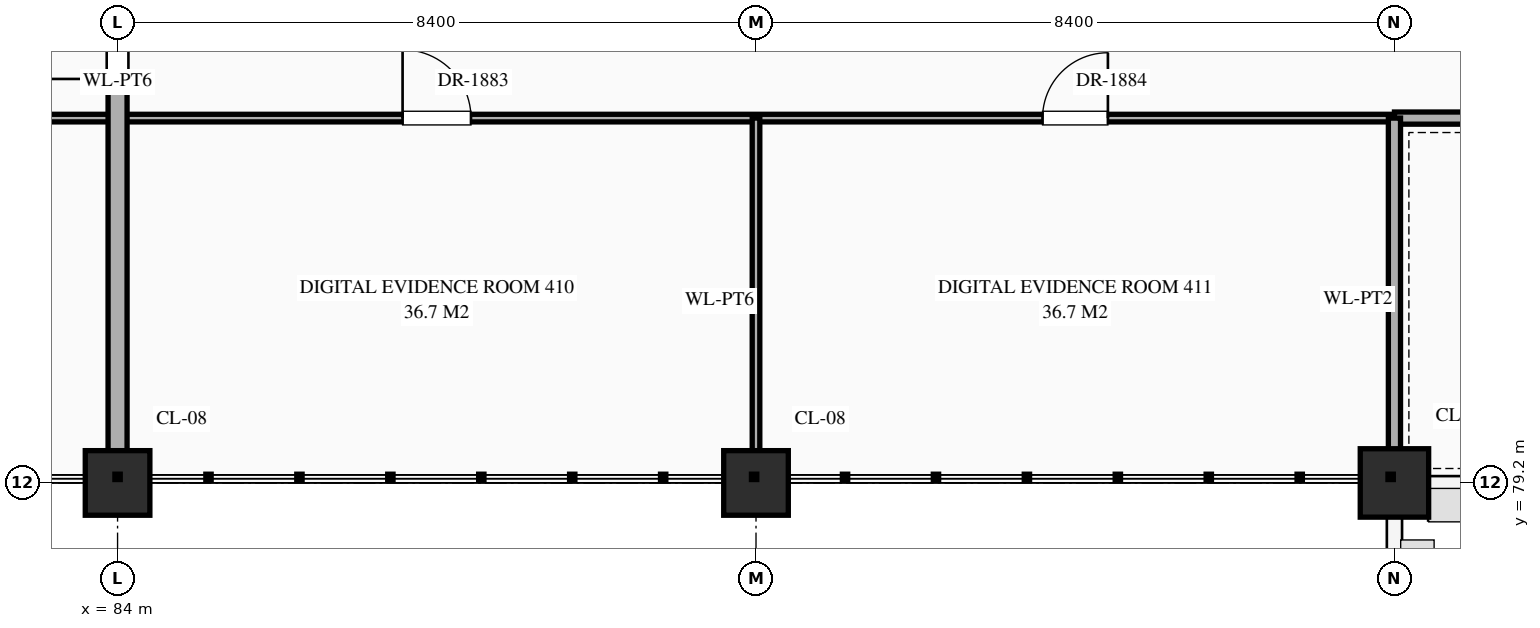
"""IFC4 building model, lengths in metres.
Left out: names, types, materials, properties, quantities, classifications, styles, units other than length and angle.
Written with IfcOpenShell. Run it as: python <this file> out.ifc"""

import sys

from ifc_helpers import new_model, si_unit, direction, frame, frame_2d, origin, origin_2d, place, context, subcontext, project, spatial, rectangle, circle, extrude, element, fill, save


model = new_model("IFC4")
c1 = context("Model", 3, precision=1e-05, world=origin(), true_north=direction((0.0, 1.0)))
c2 = subcontext(c1, "Body", "Model", "MODEL_VIEW")
j1 = project(units=[si_unit("LENGTHUNIT", "METRE"), si_unit("PLANEANGLEUNIT", "RADIAN")], contexts=[c1])
p1 = place(None, origin())
s1 = spatial("IfcSite", under=j1, at=p1, CompositionType="ELEMENT")
p2 = place(p1, origin())
s2 = spatial("IfcBuilding", under=s1, at=p2, CompositionType="ELEMENT")
p3 = place(p2, frame((0.0, 0.0, 16.2)))
s3 = spatial("IfcBuildingStorey", under=s2, at=p3, CompositionType="ELEMENT", Elevation=16.2)
for number, where, z_axis, x_axis in (
    (1, (84.0, 79.2, 0.0), (0.0, 0.0, 1.0), (1.0, 0.0, 0.0)),
    (2, (92.4, 79.2, 0.0), (0.0, 0.0, 1.0), (1.0, 0.0, 0.0)),
):
    element("IfcColumn", number, at=place(p3, frame(where, z_axis=z_axis, x_axis=x_axis)), inside=s3, PredefinedType="COLUMN", context=c2, shape_type="SweptSolid", body=[
        extrude(circle(Radius=0.425, at=origin_2d()), origin(), (0.0, 0.0, 1.0), 5.4),
    ])
p4 = place(p3, frame((100.8, 79.2, 0.0), z_axis=(0.0, 0.0, 1.0), x_axis=(1.0, 0.0, 0.0)))
e3 = element("IfcColumn", 3, at=p4, inside=s3, PredefinedType="COLUMN", context=c2, shape_type="SweptSolid", body=[
    extrude(rectangle(XDim=0.9, YDim=0.9, at=origin_2d()), origin(), (0.0, 0.0, 1.0), 5.4),
])
p5 = place(p3, frame((67.2, 84.0, 0.0), z_axis=(0.0, 0.0, 1.0), x_axis=(1.0, 0.0, 0.0)))
e4 = element("IfcWall", 4, at=p5, inside=s3, PredefinedType="STANDARD", context=c2, shape_type="SweptSolid", body=[
    extrude(rectangle(XDim=33.6, YDim=0.1, at=frame_2d((16.8, 0.0))), origin(), (0.0, 0.0, 1.0), 5.12),
])
p6 = place(p5, frame((3.69, 0.0, 0.0)))
e5 = element("IfcOpeningElement", 5, at=p6, cuts=e4, PredefinedType="OPENING", context=c2, shape_type="SweptSolid", body=[
    extrude(rectangle(XDim=1.02, YDim=2.4, at=frame_2d((0.51, 1.2))), frame((0.0, 0.062, 0.0), z_axis=(0.0, -1.0, 0.0), x_axis=(1.0, 0.0, 0.0)), (0.0, 0.0, 1.0), 0.124),
])
p7 = place(p5, frame((12.07, 0.0, 0.0)))
e6 = element("IfcOpeningElement", 6, at=p7, cuts=e4, PredefinedType="OPENING", context=c2, shape_type="SweptSolid", body=[
    extrude(rectangle(XDim=1.06, YDim=2.4, at=frame_2d((0.53, 1.2))), frame((0.0, 0.062, 0.0), z_axis=(0.0, -1.0, 0.0), x_axis=(1.0, 0.0, 0.0)), (0.0, 0.0, 1.0), 0.124),
])
p8 = place(p5, frame((20.55, 0.0, 0.0)))
e7 = element("IfcOpeningElement", 7, at=p8, cuts=e4, PredefinedType="OPENING", context=c2, shape_type="SweptSolid", body=[
    extrude(rectangle(XDim=0.9, YDim=2.15, at=frame_2d((0.45, 1.075))), frame((0.0, 0.062, 0.0), z_axis=(0.0, -1.0, 0.0), x_axis=(1.0, 0.0, 0.0)), (0.0, 0.0, 1.0), 0.124),
])
p9 = place(p5, frame((28.97, 0.0, 0.0)))
e8 = element("IfcOpeningElement", 8, at=p9, cuts=e4, PredefinedType="OPENING", context=c2, shape_type="SweptSolid", body=[
    extrude(rectangle(XDim=0.86, YDim=2.1, at=frame_2d((0.43, 1.05))), frame((0.0, 0.062, 0.0), z_axis=(0.0, -1.0, 0.0), x_axis=(1.0, 0.0, 0.0)), (0.0, 0.0, 1.0), 0.124),
])
p10 = place(p3, frame((100.8, 84.0, 0.0), z_axis=(0.0, 0.0, 1.0), x_axis=(1.0, 0.0, 0.0)))
e9 = element("IfcWall", 9, at=p10, inside=s3, PredefinedType="STANDARD", context=c2, shape_type="SweptSolid", body=[
    extrude(rectangle(XDim=16.8, YDim=0.16, at=frame_2d((8.4, 0.0))), origin(), (0.0, 0.0, 1.0), 5.12),
])
p11 = place(p10, frame((7.45, 0.0, 0.0)))
e10 = element("IfcOpeningElement", 10, at=p11, cuts=e9, PredefinedType="OPENING", context=c2, shape_type="SweptSolid", body=[
    extrude(rectangle(XDim=1.9, YDim=2.5, at=frame_2d((0.95, 1.25))), frame((0.0, 0.092, 0.0), z_axis=(0.0, -1.0, 0.0), x_axis=(1.0, 0.0, 0.0)), (0.0, 0.0, 1.0), 0.184),
])
p12 = place(p3, frame((84.0, 79.2, 0.0), z_axis=(0.0, 0.0, 1.0), x_axis=(0.0, 1.0, 0.0)))
e11 = element("IfcWall", 11, at=p12, inside=s3, PredefinedType="STANDARD", context=c2, shape_type="SweptSolid", body=[
    extrude(rectangle(XDim=35.96, YDim=0.25, at=frame_2d((17.98, 0.0))), origin(), (0.0, 0.0, 1.0), 4.37),
])
p13 = place(p12, frame((22.585, 0.0, 0.0)))
e12 = element("IfcOpeningElement", 12, at=p13, cuts=e11, PredefinedType="OPENING", context=c2, shape_type="SweptSolid", body=[
    extrude(rectangle(XDim=2.0, YDim=2.4, at=frame_2d((1.0, 1.2))), frame((0.0, 0.137, 0.0), z_axis=(0.0, -1.0, 0.0), x_axis=(1.0, 0.0, 0.0)), (0.0, 0.0, 1.0), 0.274),
])
p14 = place(p12, frame((12.465, 0.0, 0.0)))
e13 = element("IfcOpeningElement", 13, at=p14, cuts=e11, PredefinedType="OPENING", context=c2, shape_type="SweptSolid", body=[
    extrude(rectangle(XDim=1.1, YDim=2.2, at=frame_2d((0.55, 1.1))), frame((0.0, 0.137, 0.0), z_axis=(0.0, -1.0, 0.0), x_axis=(1.0, 0.0, 0.0)), (0.0, 0.0, 1.0), 0.274),
])
p15 = place(p12, frame((15.31, 0.0, 0.0)))
e14 = element("IfcOpeningElement", 14, at=p15, cuts=e11, PredefinedType="OPENING", context=c2, shape_type="SweptSolid", body=[
    extrude(rectangle(XDim=0.95, YDim=2.15, at=frame_2d((0.475, 1.075))), frame((0.0, 0.137, 0.0), z_axis=(0.0, -1.0, 0.0), x_axis=(1.0, 0.0, 0.0)), (0.0, 0.0, 1.0), 0.274),
])
p16 = place(p12, frame((26.065, 0.0, 0.0)))
e15 = element("IfcOpeningElement", 15, at=p16, cuts=e11, PredefinedType="OPENING", context=c2, shape_type="SweptSolid", body=[
    extrude(rectangle(XDim=1.5, YDim=2.25, at=frame_2d((0.75, 1.125))), frame((0.0, 0.137, 0.0), z_axis=(0.0, -1.0, 0.0), x_axis=(1.0, 0.0, 0.0)), (0.0, 0.0, 1.0), 0.274),
])
p17 = place(p12, frame((29.71, 0.0, 0.0)))
e16 = element("IfcOpeningElement", 16, at=p17, cuts=e11, PredefinedType="OPENING", context=c2, shape_type="SweptSolid", body=[
    extrude(rectangle(XDim=0.95, YDim=2.15, at=frame_2d((0.475, 1.075))), frame((0.0, 0.137, 0.0), z_axis=(0.0, -1.0, 0.0), x_axis=(1.0, 0.0, 0.0)), (0.0, 0.0, 1.0), 0.274),
])
p18 = place(p12, frame((5.315, 0.0, 0.0)))
e17 = element("IfcOpeningElement", 17, at=p18, cuts=e11, PredefinedType="OPENING", context=c2, shape_type="SweptSolid", body=[
    extrude(rectangle(XDim=1.0, YDim=2.2, at=frame_2d((0.5, 1.1))), frame((0.0, 0.137, 0.0), z_axis=(0.0, -1.0, 0.0), x_axis=(1.0, 0.0, 0.0)), (0.0, 0.0, 1.0), 0.274),
])
p19 = place(p3, frame((92.4, 79.2, 0.0), z_axis=(0.0, 0.0, 1.0), x_axis=(0.0, 1.0, 0.0)))
e18 = element("IfcWall", 18, at=p19, inside=s3, PredefinedType="STANDARD", context=c2, shape_type="SweptSolid", body=[
    extrude(rectangle(XDim=4.8, YDim=0.1, at=frame_2d((2.4, 0.0))), origin(), (0.0, 0.0, 1.0), 4.37),
])
p20 = place(p3, frame((100.8, 79.24, 0.0), z_axis=(0.0, 0.0, 1.0), x_axis=(0.0, 1.0, 0.0)))
e19 = element("IfcWall", 19, at=p20, inside=s3, PredefinedType="STANDARD", context=c2, shape_type="SweptSolid", body=[
    extrude(rectangle(XDim=4.76, YDim=0.16, at=frame_2d((2.38, 0.0))), origin(), (0.0, 0.0, 1.0), 4.37),
])
p21 = place(p18, origin())
e20 = element("IfcDoor", 20, at=p21, inside=s3, OperationType="SINGLE_SWING_LEFT", PredefinedType="DOOR", context=c2, shape_type="SweptSolid", body=[
    extrude(rectangle(XDim=1.0, YDim=2.2, at=frame_2d((0.5, 1.1))), frame((0.0, 0.025, 0.0), z_axis=(0.0, -1.0, 0.0), x_axis=(1.0, 0.0, 0.0)), (0.0, 0.0, 1.0), 0.05),
])
fill(e17, e20)
p22 = place(p8, origin())
e21 = element("IfcDoor", 21, at=p22, inside=s3, OperationType="SINGLE_SWING_LEFT", PredefinedType="DOOR", context=c2, shape_type="SweptSolid", body=[
    extrude(rectangle(XDim=0.9, YDim=2.15, at=frame_2d((0.45, 1.075))), frame((0.0, 0.025, 0.0), z_axis=(0.0, -1.0, 0.0), x_axis=(1.0, 0.0, 0.0)), (0.0, 0.0, 1.0), 0.05),
])
fill(e7, e21)
p23 = place(p9, origin())
e22 = element("IfcDoor", 22, at=p23, inside=s3, OperationType="SINGLE_SWING_RIGHT", PredefinedType="DOOR", context=c2, shape_type="SweptSolid", body=[
    extrude(rectangle(XDim=0.86, YDim=2.1, at=frame_2d((0.43, 1.05))), frame((0.0, 0.025, 0.0), z_axis=(0.0, -1.0, 0.0), x_axis=(1.0, 0.0, 0.0)), (0.0, 0.0, 1.0), 0.05),
])
fill(e8, e22)
save(model, sys.argv[1])
